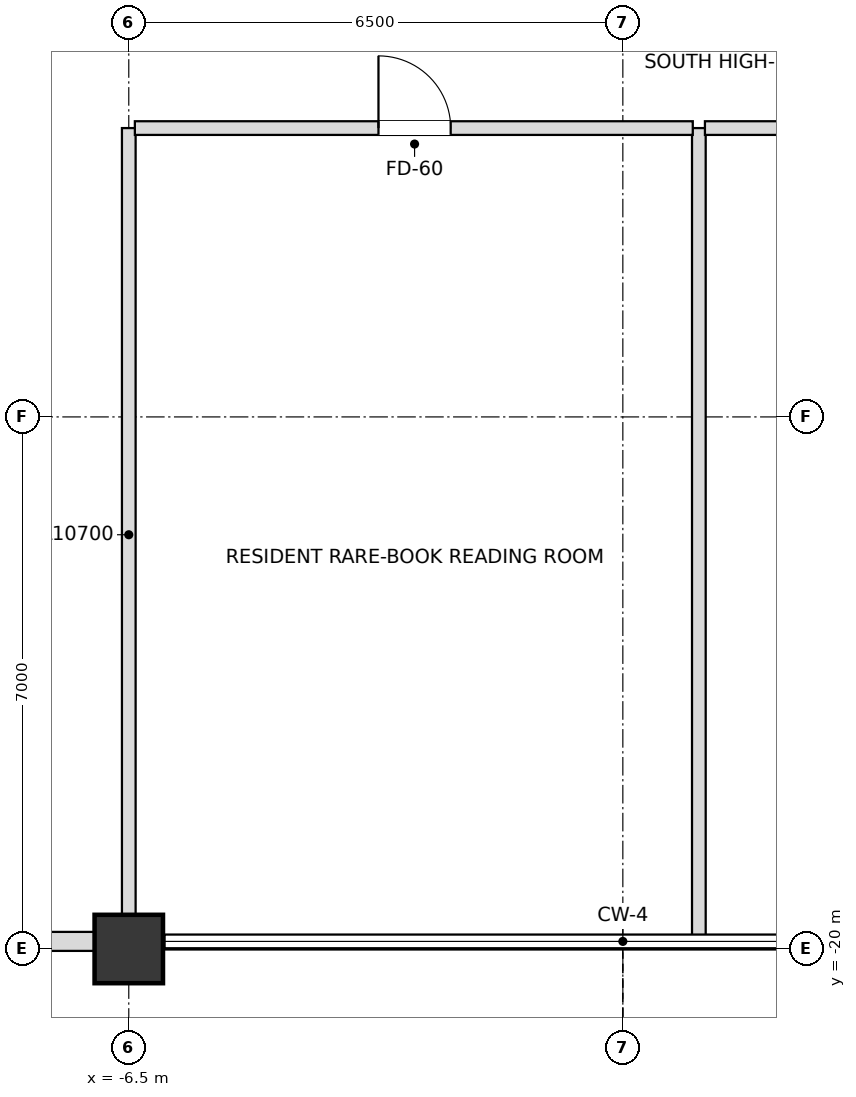
"""IFC4 building model, lengths in metres.
Left out: names, types, materials, properties, quantities, classifications, styles, units other than length and angle.
Written with IfcOpenShell. Run it as: python <this file> out.ifc"""

import sys

from ifc_helpers import new_model, si_unit, direction, frame, frame_2d, origin, origin_2d, place, context, subcontext, project, spatial, rectangle, extrude, element, fill, save


model = new_model("IFC4")
c1 = context("Model", 3, precision=1e-05, world=origin(), true_north=direction((0.0, 1.0)))
c2 = subcontext(c1, "Body", "Model", "MODEL_VIEW")
j1 = project(units=[si_unit("LENGTHUNIT", "METRE"), si_unit("PLANEANGLEUNIT", "RADIAN")], contexts=[c1])
p1 = place(None, origin())
s1 = spatial("IfcSite", under=j1, at=p1, CompositionType="ELEMENT")
p2 = place(p1, origin())
s2 = spatial("IfcBuilding", under=s1, at=p2, CompositionType="ELEMENT")
p3 = place(p2, frame((0.0, 0.0, 272.7)))
s3 = spatial("IfcBuildingStorey", under=s2, at=p3, CompositionType="ELEMENT", Elevation=272.7)
p4 = place(p3, frame((-6.5, -20.0, 0.0), z_axis=(0.0, 0.0, 1.0), x_axis=(1.0, 0.0, 0.0)))
e1 = element("IfcColumn", 1, at=p4, inside=s3, PredefinedType="USERDEFINED", context=c2, shape_type="SweptSolid", body=[
    extrude(rectangle(XDim=0.9, YDim=0.9, at=origin_2d()), origin(), (0.0, 0.0, 1.0), 3.6),
])
p5 = place(p3, frame((-11.055, -19.9, 0.0), z_axis=(0.0, 0.0, 1.0), x_axis=(1.0, 0.0, 0.0)))
e2 = element("IfcWall", 2, at=p5, inside=s3, PredefinedType="SOLIDWALL", context=c2, shape_type="SweptSolid", body=[
    extrude(rectangle(XDim=4.11, YDim=0.25, at=frame_2d((2.055, 0.0))), origin(), (0.0, 0.0, 1.0), 2.748),
])
p6 = place(p5, frame((1.155, 0.0, 0.72)))
e3 = element("IfcOpeningElement", 3, at=p6, cuts=e2, PredefinedType="OPENING", context=c2, shape_type="SweptSolid", body=[
    extrude(rectangle(XDim=1.8, YDim=1.68, at=frame_2d((0.9, 0.84))), frame((0.0, 0.135, 0.0), z_axis=(0.0, -1.0, 0.0), x_axis=(1.0, 0.0, 0.0)), (0.0, 0.0, 1.0), 0.27),
])
p7 = place(p3, frame((-6.5, -19.9, 0.0), z_axis=(0.0, 0.0, 1.0), x_axis=(0.0, 1.0, 0.0)))
e4 = element("IfcWall", 4, at=p7, inside=s3, PredefinedType="PARTITIONING", context=c2, shape_type="SweptSolid", body=[
    extrude(rectangle(XDim=10.7, YDim=0.18, at=frame_2d((5.35, 0.0))), origin(), (0.0, 0.0, 1.0), 2.826),
])
p8 = place(p3, frame((1.0, -19.9, 0.0), z_axis=(0.0, 0.0, 1.0), x_axis=(0.0, 1.0, 0.0)))
e5 = element("IfcWall", 5, at=p8, inside=s3, PredefinedType="PARTITIONING", context=c2, shape_type="SweptSolid", body=[
    extrude(rectangle(XDim=10.7, YDim=0.18, at=frame_2d((5.35, 0.0))), origin(), (0.0, 0.0, 1.0), 3.018),
])
p9 = place(p3, frame((-6.42, -9.2, 0.0), z_axis=(0.0, 0.0, 1.0), x_axis=(1.0, 0.0, 0.0)))
e6 = element("IfcWall", 6, at=p9, inside=s3, PredefinedType="PARTITIONING", context=c2, shape_type="SweptSolid", body=[
    extrude(rectangle(XDim=7.34, YDim=0.18, at=frame_2d((3.67, 0.0))), origin(), (0.0, 0.0, 1.0), 3.38),
])
p10 = place(p9, frame((3.205, 0.0, 0.0)))
e7 = element("IfcOpeningElement", 7, at=p10, cuts=e6, PredefinedType="OPENING", context=c2, shape_type="SweptSolid", body=[
    extrude(rectangle(XDim=0.95, YDim=2.15, at=frame_2d((0.475, 1.075))), frame((0.0, 0.1, 0.0), z_axis=(0.0, -1.0, 0.0), x_axis=(1.0, 0.0, 0.0)), (0.0, 0.0, 1.0), 0.2),
])
p11 = place(p3, frame((1.08, -9.2, 0.0), z_axis=(0.0, 0.0, 1.0), x_axis=(1.0, 0.0, 0.0)))
e8 = element("IfcWall", 8, at=p11, inside=s3, PredefinedType="PARTITIONING", context=c2, shape_type="SweptSolid", body=[
    extrude(rectangle(XDim=7.64, YDim=0.18, at=frame_2d((3.82, 0.0))), origin(), (0.0, 0.0, 1.0), 2.826),
])
p12 = place(p11, frame((3.355, 0.0, 0.0)))
e9 = element("IfcOpeningElement", 9, at=p12, cuts=e8, PredefinedType="OPENING", context=c2, shape_type="SweptSolid", body=[
    extrude(rectangle(XDim=0.95, YDim=2.15, at=frame_2d((0.475, 1.075))), frame((0.0, 0.1, 0.0), z_axis=(0.0, -1.0, 0.0), x_axis=(1.0, 0.0, 0.0)), (0.0, 0.0, 1.0), 0.2),
])
p13 = place(p10, origin())
e10 = element("IfcDoor", 10, at=p13, inside=s3, OperationType="SINGLE_SWING_LEFT", PredefinedType="DOOR", context=c2, shape_type="SweptSolid", body=[
    extrude(rectangle(XDim=0.95, YDim=2.15, at=frame_2d((0.475, 1.075))), frame((0.0, 0.025, 0.0), z_axis=(0.0, -1.0, 0.0), x_axis=(1.0, 0.0, 0.0)), (0.0, 0.0, 1.0), 0.05),
])
fill(e7, e10)
save(model, sys.argv[1])
